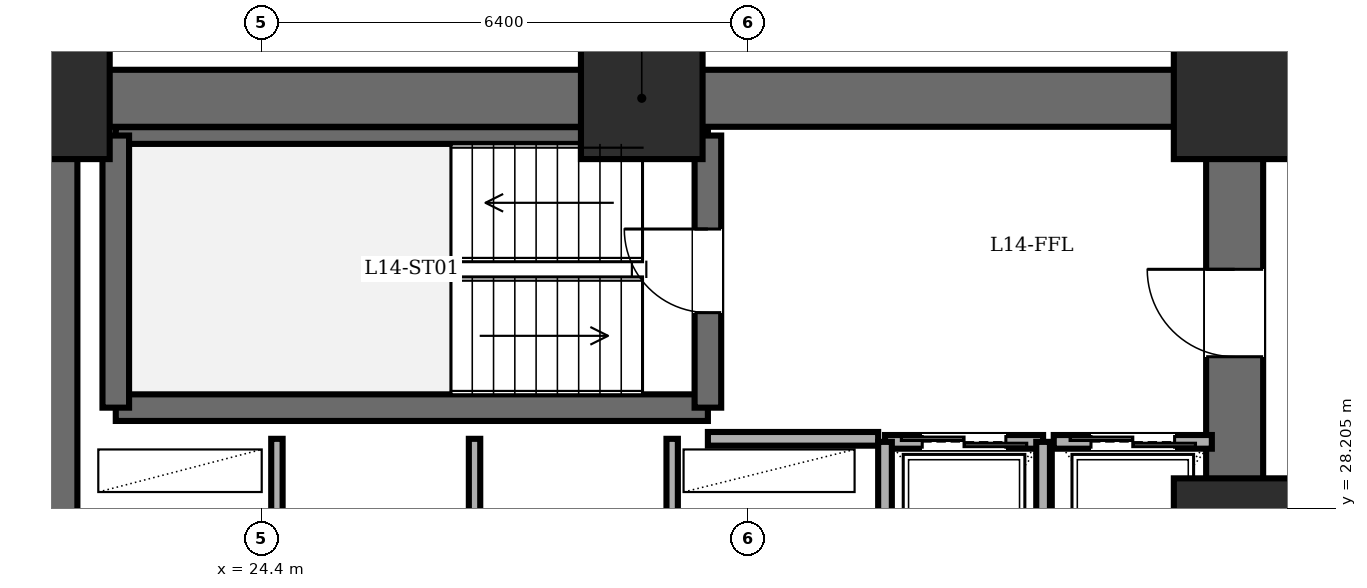
"""IFC4 building model, lengths in metres.
Left out: names, types, materials, properties, quantities, classifications, styles, units other than length and angle.
Written with IfcOpenShell. Run it as: python <this file> out.ifc"""

import sys

from ifc_helpers import new_model, si_unit, direction, frame, frame_2d, origin, origin_2d, place, context, subcontext, project, spatial, rectangle, extrude, element, fill, save


model = new_model("IFC4")
c1 = context("Model", 3, precision=1e-05, world=origin(), true_north=direction((0.0, 1.0)))
c2 = subcontext(c1, "Body", "Model", "MODEL_VIEW")
j1 = project(units=[si_unit("LENGTHUNIT", "METRE"), si_unit("PLANEANGLEUNIT", "RADIAN")], contexts=[c1])
p1 = place(None, origin())
s1 = spatial("IfcSite", under=j1, at=p1, CompositionType="ELEMENT")
p2 = place(p1, origin())
s2 = spatial("IfcBuilding", under=s1, at=p2, CompositionType="ELEMENT")
p3 = place(p2, frame((0.0, 0.0, 54.0)))
s3 = spatial("IfcBuildingStorey", under=s2, at=p3, CompositionType="ELEMENT", Elevation=54.0)
for number, where, z_axis, x_axis in (
    (1, (37.2, 27.8, 0.0), (0.0, 0.0, 1.0), (1.0, 0.0, 0.0)),
    (2, (37.2, 33.6, 0.0), (0.0, 0.0, 1.0), (1.0, 0.0, 0.0)),
    (3, (29.4, 33.6, 0.0), (0.0, 0.0, 1.0), (1.0, 0.0, 0.0)),
    (4, (21.6, 33.6, 0.0), (0.0, 0.0, 1.0), (1.0, 0.0, 0.0)),
):
    element("IfcColumn", number, at=place(p3, frame(where, z_axis=z_axis, x_axis=x_axis)), inside=s3, PredefinedType="COLUMN", context=c2, shape_type="SweptSolid", body=[
        extrude(rectangle(XDim=1.6, YDim=1.6, at=origin_2d()), origin(), (0.0, 0.0, 1.0), 3.6),
    ])
p4 = place(p3, frame((21.6, 14.4, 0.0), z_axis=(0.0, 0.0, 1.0), x_axis=(0.0, 1.0, 0.0)))
e5 = element("IfcWall", 5, at=p4, inside=s3, PredefinedType="SHEAR", context=c2, shape_type="SweptSolid", body=[
    extrude(rectangle(XDim=19.2, YDim=0.75, at=frame_2d((9.6, 0.0))), origin(), (0.0, 0.0, 1.0), 3.4),
])
p5 = place(p3, frame((21.6, 33.6, 0.0), z_axis=(0.0, 0.0, 1.0), x_axis=(1.0, 0.0, 0.0)))
e6 = element("IfcWall", 6, at=p5, inside=s3, PredefinedType="SHEAR", context=c2, shape_type="SweptSolid", body=[
    extrude(rectangle(XDim=15.6, YDim=0.75, at=frame_2d((7.8, 0.0))), origin(), (0.0, 0.0, 1.0), 3.4),
])
p6 = place(p3, frame((37.2, 14.4, 0.0), z_axis=(0.0, 0.0, 1.0), x_axis=(0.0, 1.0, 0.0)))
e7 = element("IfcWall", 7, at=p6, inside=s3, PredefinedType="SHEAR", context=c2, shape_type="SweptSolid", body=[
    extrude(rectangle(XDim=19.2, YDim=0.75, at=frame_2d((9.6, 0.0))), origin(), (0.0, 0.0, 1.0), 3.4),
])
p7 = place(p6, frame((15.8, 0.0, 0.0)))
e8 = element("IfcOpeningElement", 8, at=p7, cuts=e7, PredefinedType="OPENING", context=c2, shape_type="SweptSolid", body=[
    extrude(rectangle(XDim=1.15, YDim=2.15, at=frame_2d((0.575, 1.075))), frame((0.0, 0.385, 0.0), z_axis=(0.0, -1.0, 0.0), x_axis=(1.0, 0.0, 0.0)), (0.0, 0.0, 1.0), 0.77),
])
p8 = place(p6, frame((3.6, 0.0, 0.0)))
e9 = element("IfcOpeningElement", 9, at=p8, cuts=e7, PredefinedType="OPENING", context=c2, shape_type="SweptSolid", body=[
    extrude(rectangle(XDim=1.1, YDim=2.15, at=frame_2d((0.55, 1.075))), frame((0.0, 0.385, 0.0), z_axis=(0.0, -1.0, 0.0), x_axis=(1.0, 0.0, 0.0)), (0.0, 0.0, 1.0), 0.77),
])
p9 = place(p6, frame((8.6, 0.0, 0.0)))
e10 = element("IfcOpeningElement", 10, at=p9, cuts=e7, PredefinedType="OPENING", context=c2, shape_type="SweptSolid", body=[
    extrude(rectangle(XDim=1.3, YDim=2.2, at=frame_2d((0.65, 1.1))), frame((0.0, 0.385, 0.0), z_axis=(0.0, -1.0, 0.0), x_axis=(1.0, 0.0, 0.0)), (0.0, 0.0, 1.0), 0.77),
])
p10 = place(p3, frame((22.48, 29.53, 0.0), z_axis=(0.0, 0.0, 1.0), x_axis=(1.0, 0.0, 0.0)))
e11 = element("IfcWall", 11, at=p10, inside=s3, PredefinedType="SOLIDWALL", context=c2, shape_type="SweptSolid", body=[
    extrude(rectangle(XDim=7.79, YDim=0.35, at=frame_2d((3.895, 0.0))), origin(), (0.0, 0.0, 1.0), 3.4),
])
p11 = place(p3, frame((22.48, 33.11, 0.0), z_axis=(0.0, 0.0, 1.0), x_axis=(1.0, 0.0, 0.0)))
e12 = element("IfcWall", 12, at=p11, inside=s3, PredefinedType="PARTITIONING", context=c2, shape_type="SweptSolid", body=[
    extrude(rectangle(XDim=7.79, YDim=0.22, at=frame_2d((3.895, 0.0))), origin(), (0.0, 0.0, 1.0), 3.4),
])
p12 = place(p3, frame((22.48, 29.53, 0.0), z_axis=(0.0, 0.0, 1.0), x_axis=(0.0, 1.0, 0.0)))
e13 = element("IfcWall", 13, at=p12, inside=s3, PredefinedType="SOLIDWALL", context=c2, shape_type="SweptSolid", body=[
    extrude(rectangle(XDim=3.58, YDim=0.35, at=frame_2d((1.79, 0.0))), origin(), (0.0, 0.0, 1.0), 3.4),
])
p13 = place(p3, frame((30.27, 29.53, 0.0), z_axis=(0.0, 0.0, 1.0), x_axis=(0.0, 1.0, 0.0)))
e14 = element("IfcWall", 14, at=p13, inside=s3, PredefinedType="SOLIDWALL", context=c2, shape_type="SweptSolid", body=[
    extrude(rectangle(XDim=3.58, YDim=0.35, at=frame_2d((1.79, 0.0))), origin(), (0.0, 0.0, 1.0), 3.4),
])
p14 = place(p13, frame((1.25, 0.0, 0.0)))
e15 = element("IfcOpeningElement", 15, at=p14, cuts=e14, PredefinedType="OPENING", context=c2, shape_type="SweptSolid", body=[
    extrude(rectangle(XDim=1.1, YDim=2.15, at=frame_2d((0.55, 1.075))), frame((0.0, 0.185, 0.0), z_axis=(0.0, -1.0, 0.0), x_axis=(1.0, 0.0, 0.0)), (0.0, 0.0, 1.0), 0.37),
])
p15 = place(p3, frame((30.27, 29.12, 0.0), z_axis=(0.0, 0.0, 1.0), x_axis=(1.0, 0.0, 0.0)))
e16 = element("IfcWall", 16, at=p15, inside=s3, PredefinedType="PARTITIONING", context=c2, shape_type="SweptSolid", body=[
    extrude(rectangle(XDim=2.24, YDim=0.18, at=frame_2d((1.12, 0.0))), origin(), (0.0, 0.0, 1.0), 3.4),
])
for number, where, z_axis, x_axis in (
    (17, (24.6, 27.6, 0.0), (0.0, 0.0, 1.0), (0.0, 1.0, 0.0)),
    (18, (27.2, 27.6, 0.0), (0.0, 0.0, 1.0), (0.0, 1.0, 0.0)),
    (19, (29.8, 27.6, 0.0), (0.0, 0.0, 1.0), (0.0, 1.0, 0.0)),
):
    element("IfcWall", number, at=place(p3, frame(where, z_axis=z_axis, x_axis=x_axis)), inside=s3, PredefinedType="PARTITIONING", context=c2, shape_type="SweptSolid", body=[
        extrude(rectangle(XDim=1.52, YDim=0.15, at=frame_2d((0.76, 0.0))), origin(), (0.0, 0.0, 1.0), 3.4),
    ])
p16 = place(p3, frame((32.6, 29.08, 0.0), z_axis=(0.0, 0.0, 1.0), x_axis=(1.0, 0.0, 0.0)))
e20 = element("IfcWall", 20, at=p16, inside=s3, PredefinedType="PARTITIONING", context=c2, shape_type="SweptSolid", body=[
    extrude(rectangle(XDim=2.08, YDim=0.18, at=frame_2d((1.04, 0.0))), origin(), (0.0, 0.0, 1.0), 3.4),
])
p17 = place(p16, frame((0.49, 0.0, 0.0)))
e21 = element("IfcOpeningElement", 21, at=p17, cuts=e20, PredefinedType="OPENING", context=c2, shape_type="SweptSolid", body=[
    extrude(rectangle(XDim=1.1, YDim=2.2, at=frame_2d((0.55, 1.1))), frame((0.0, 0.1, 0.0), z_axis=(0.0, -1.0, 0.0), x_axis=(1.0, 0.0, 0.0)), (0.0, 0.0, 1.0), 0.2),
])
for number, where, z_axis, x_axis in (
    (22, (34.68, 26.35, 0.0), (0.0, 0.0, 1.0), (0.0, 1.0, 0.0)),
    (23, (32.6, 29.08, 0.0), (0.0, 0.0, 1.0), (0.0, -1.0, 0.0)),
):
    element("IfcWall", number, at=place(p3, frame(where, z_axis=z_axis, x_axis=x_axis)), inside=s3, PredefinedType="PARTITIONING", context=c2, shape_type="SweptSolid", body=[
        extrude(rectangle(XDim=2.73, YDim=0.18, at=frame_2d((1.365, 0.0))), origin(), (0.0, 0.0, 1.0), 3.4),
    ])
p18 = place(p3, frame((34.82, 29.08, 0.0), z_axis=(0.0, 0.0, 1.0), x_axis=(1.0, 0.0, 0.0)))
e24 = element("IfcWall", 24, at=p18, inside=s3, PredefinedType="PARTITIONING", context=c2, shape_type="SweptSolid", body=[
    extrude(rectangle(XDim=2.08, YDim=0.18, at=frame_2d((1.04, 0.0))), origin(), (0.0, 0.0, 1.0), 3.4),
])
p19 = place(p18, frame((0.49, 0.0, 0.0)))
e25 = element("IfcOpeningElement", 25, at=p19, cuts=e24, PredefinedType="OPENING", context=c2, shape_type="SweptSolid", body=[
    extrude(rectangle(XDim=1.1, YDim=2.2, at=frame_2d((0.55, 1.1))), frame((0.0, 0.1, 0.0), z_axis=(0.0, -1.0, 0.0), x_axis=(1.0, 0.0, 0.0)), (0.0, 0.0, 1.0), 0.2),
])
p20 = place(p14, origin())
e26 = element("IfcDoor", 26, at=p20, inside=s3, OperationType="SINGLE_SWING_RIGHT", PredefinedType="DOOR", context=c2, shape_type="SweptSolid", body=[
    extrude(rectangle(XDim=1.1, YDim=2.15, at=frame_2d((0.55, 1.075))), frame((0.0, 0.025, 0.0), z_axis=(0.0, -1.0, 0.0), x_axis=(1.0, 0.0, 0.0)), (0.0, 0.0, 1.0), 0.05),
])
fill(e15, e26)
p21 = place(p7, origin())
e27 = element("IfcDoor", 27, at=p21, inside=s3, OperationType="SINGLE_SWING_RIGHT", PredefinedType="DOOR", context=c2, shape_type="SweptSolid", body=[
    extrude(rectangle(XDim=1.15, YDim=2.15, at=frame_2d((0.575, 1.075))), frame((0.0, 0.025, 0.0), z_axis=(0.0, -1.0, 0.0), x_axis=(1.0, 0.0, 0.0)), (0.0, 0.0, 1.0), 0.05),
])
fill(e8, e27)
p22 = place(p17, origin())
e28 = element("IfcDoor", 28, at=p22, inside=s3, OperationType="DOUBLE_DOOR_SLIDING", PredefinedType="DOOR", context=c2, shape_type="SweptSolid", body=[
    extrude(rectangle(XDim=1.1, YDim=2.2, at=frame_2d((0.55, 1.1))), frame((0.0, 0.025, 0.0), z_axis=(0.0, -1.0, 0.0), x_axis=(1.0, 0.0, 0.0)), (0.0, 0.0, 1.0), 0.05),
])
fill(e21, e28)
p23 = place(p19, origin())
e29 = element("IfcDoor", 29, at=p23, inside=s3, OperationType="DOUBLE_DOOR_SLIDING", PredefinedType="DOOR", context=c2, shape_type="SweptSolid", body=[
    extrude(rectangle(XDim=1.1, YDim=2.2, at=frame_2d((0.55, 1.1))), frame((0.0, 0.025, 0.0), z_axis=(0.0, -1.0, 0.0), x_axis=(1.0, 0.0, 0.0)), (0.0, 0.0, 1.0), 0.05),
])
fill(e25, e29)
save(model, sys.argv[1])
